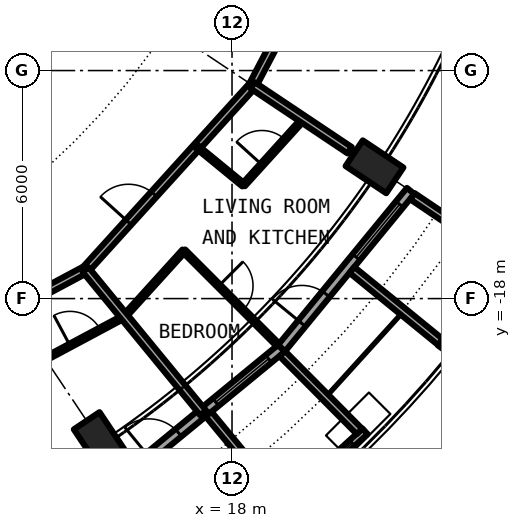
"""IFC4 building model, lengths in metres.
Left out: names, types, materials, properties, quantities, classifications, styles, units other than length and angle.
Written with IfcOpenShell. Run it as: python <this file> out.ifc"""

import sys

from ifc_helpers import new_model, si_unit, direction, frame, frame_2d, origin, origin_2d, place, context, subcontext, project, spatial, rectangle, circle, hollow_circle, extrude, element, fill, save


model = new_model("IFC4")
c1 = context("Model", 3, precision=1e-05, world=origin(), true_north=direction((0.0, 1.0)))
c2 = subcontext(c1, "Body", "Model", "MODEL_VIEW")
j1 = project(units=[si_unit("LENGTHUNIT", "METRE"), si_unit("PLANEANGLEUNIT", "RADIAN")], contexts=[c1])
p1 = place(None, origin())
s1 = spatial("IfcSite", under=j1, at=p1, CompositionType="ELEMENT")
p2 = place(p1, origin())
s2 = spatial("IfcBuilding", under=s1, at=p2, CompositionType="ELEMENT")
p3 = place(p2, frame((0.0, 0.0, 234.05)))
s3 = spatial("IfcBuildingStorey", under=s2, at=p3, CompositionType="ELEMENT", Elevation=234.05)
for number, where, z_axis, x_axis in (
    (1, (14.889, -22.283, 0.0), (-0.232, 0.347, 0.909), (-0.831, -0.556, 0.0)),
    (2, (22.283, -14.889, 0.0), (-0.347, 0.232, 0.909), (-0.556, -0.831, 0.0)),
):
    element("IfcColumn", number, at=place(p3, frame(where, z_axis=z_axis, x_axis=x_axis)), inside=s3, PredefinedType="COLUMN", context=c2, shape_type="SweptSolid", body=[
        extrude(hollow_circle(Radius=0.406, WallThickness=0.03, at=origin_2d()), origin(), (0.0, 0.0, 1.0), 3.081),
    ])
p4 = place(p3, frame((15.167, -22.699, 0.0), z_axis=(0.0, 0.0, 1.0), x_axis=(0.773019449054, 0.634382322723, 0.0)))
e3 = element("IfcWall", 3, at=p4, inside=s3, PredefinedType="SOLIDWALL", context=c2, shape_type="SweptSolid", body=[
    extrude(rectangle(XDim=5.352, YDim=0.25, at=frame_2d((2.676, 0.0))), origin(), (0.0, 0.0, 1.0), 2.7),
])
p5 = place(p4, frame((0.841, 0.0, 0.0)))
e4 = element("IfcOpeningElement", 4, at=p5, cuts=e3, PredefinedType="OPENING", context=c2, shape_type="SweptSolid", body=[
    extrude(rectangle(XDim=1.0, YDim=2.2, at=frame_2d((0.5, 1.1))), frame((0.0, 0.135, 0.0), z_axis=(0.0, -1.0, 0.0), x_axis=(1.0, 0.0, 0.0)), (0.0, 0.0, 1.0), 0.27),
])
p6 = place(p4, frame((3.111, 0.0, 0.3)))
e5 = element("IfcOpeningElement", 5, at=p6, cuts=e3, PredefinedType="OPENING", context=c2, shape_type="SweptSolid", body=[
    extrude(rectangle(XDim=1.8, YDim=2.1, at=frame_2d((0.9, 1.05))), frame((0.0, 0.135, 0.0), z_axis=(0.0, -1.0, 0.0), x_axis=(1.0, 0.0, 0.0)), (0.0, 0.0, 1.0), 0.27),
])
p7 = place(p3, frame((19.282, -23.503, -0.03), z_axis=(0.0, 0.0, 1.0), x_axis=(0.740998365753, 0.671506829416, 0.0)))
e6 = element("IfcWall", 6, at=p7, inside=s3, PredefinedType="SOLIDWALL", context=c2, shape_type="SweptSolid", body=[
    extrude(rectangle(XDim=2.993, YDim=0.2, at=frame_2d((1.497, 0.0))), origin(), (0.0, 0.0, 1.0), 2.73),
])
p8 = place(p7, frame((0.457, 0.0, 0.33)))
e7 = element("IfcOpeningElement", 7, at=p8, cuts=e6, PredefinedType="OPENING", context=c2, shape_type="SweptSolid", body=[
    extrude(circle(Radius=1.04, at=frame_2d((1.04, 1.04))), frame((0.0, 0.11, 0.0), z_axis=(0.0, -1.0, 0.0), x_axis=(1.0, 0.0, 0.0)), (0.0, 0.0, 1.0), 0.22),
])
p9 = place(p3, frame((17.384, -21.041, -0.03), z_axis=(0.0, 0.0, 1.0), x_axis=(0.63709551667, -0.770784861449, 0.0)))
e8 = element("IfcWall", 8, at=p9, inside=s3, PredefinedType="SOLIDWALL", context=c2, shape_type="SweptSolid", body=[
    extrude(rectangle(XDim=3.006, YDim=0.2, at=frame_2d((1.503, 0.0))), origin(), (0.0, 0.0, 1.0), 2.73),
])
p10 = place(p3, frame((19.323, -19.45, -0.03), z_axis=(0.0, 0.0, 1.0), x_axis=(0.704476739375, -0.709727076896, 0.0)))
e9 = element("IfcWall", 9, at=p10, inside=s3, PredefinedType="SOLIDWALL", context=c2, shape_type="SweptSolid", body=[
    extrude(rectangle(XDim=2.883, YDim=0.2, at=frame_2d((1.441, 0.0))), origin(), (0.0, 0.0, 1.0), 2.73),
])
p11 = place(p3, frame((19.304, -19.304, 0.0), z_axis=(0.0, 0.0, 1.0), x_axis=(0.634382322723, 0.773019449054, 0.0)))
e10 = element("IfcWall", 10, at=p11, inside=s3, PredefinedType="SOLIDWALL", context=c2, shape_type="SweptSolid", body=[
    extrude(rectangle(XDim=5.352, YDim=0.25, at=frame_2d((2.676, 0.0))), origin(), (0.0, 0.0, 1.0), 2.7),
])
p12 = place(p11, frame((0.841, 0.0, 0.0)))
e11 = element("IfcOpeningElement", 11, at=p12, cuts=e10, PredefinedType="OPENING", context=c2, shape_type="SweptSolid", body=[
    extrude(rectangle(XDim=1.0, YDim=2.2, at=frame_2d((0.5, 1.1))), frame((0.0, 0.135, 0.0), z_axis=(0.0, -1.0, 0.0), x_axis=(1.0, 0.0, 0.0)), (0.0, 0.0, 1.0), 0.27),
])
p13 = place(p11, frame((3.096, 0.0, 0.3)))
e12 = element("IfcOpeningElement", 12, at=p13, cuts=e10, PredefinedType="OPENING", context=c2, shape_type="SweptSolid", body=[
    extrude(rectangle(XDim=1.8, YDim=2.1, at=frame_2d((0.9, 1.05))), frame((0.0, 0.135, 0.0), z_axis=(0.0, -1.0, 0.0), x_axis=(1.0, 0.0, 0.0)), (0.0, 0.0, 1.0), 0.27),
])
p14 = place(p3, frame((23.496, -19.289, -0.03), z_axis=(0.0, 0.0, 1.0), x_axis=(0.595908005124, 0.803052706508, 0.0)))
e13 = element("IfcWall", 13, at=p14, inside=s3, PredefinedType="SOLIDWALL", context=c2, shape_type="SweptSolid", body=[
    extrude(rectangle(XDim=2.994, YDim=0.2, at=frame_2d((1.497, 0.0))), origin(), (0.0, 0.0, 1.0), 2.73),
])
p15 = place(p14, frame((0.457, 0.0, 0.33)))
e14 = element("IfcOpeningElement", 14, at=p15, cuts=e13, PredefinedType="OPENING", context=c2, shape_type="SweptSolid", body=[
    extrude(circle(Radius=1.04, at=frame_2d((1.04, 1.04))), frame((0.0, 0.11, 0.0), z_axis=(0.0, -1.0, 0.0), x_axis=(1.0, 0.0, 0.0)), (0.0, 0.0, 1.0), 0.22),
])
p16 = place(p3, frame((21.155, -17.246, -0.03), z_axis=(0.0, 0.0, 1.0), x_axis=(0.775338113639, -0.631546363729, 0.0)))
e15 = element("IfcWall", 15, at=p16, inside=s3, PredefinedType="SOLIDWALL", context=c2, shape_type="SweptSolid", body=[
    extrude(rectangle(XDim=3.005, YDim=0.2, at=frame_2d((1.502, 0.0))), origin(), (0.0, 0.0, 1.0), 2.73),
])
p17 = place(p3, frame((22.746, -15.307, -0.03), z_axis=(0.0, 0.0, 1.0), x_axis=(0.829448139117, -0.558583730979, 0.0)))
e16 = element("IfcWall", 16, at=p17, inside=s3, PredefinedType="SOLIDWALL", context=c2, shape_type="SweptSolid", body=[
    extrude(rectangle(XDim=2.883, YDim=0.2, at=frame_2d((1.441, 0.0))), origin(), (0.0, 0.0, 1.0), 2.73),
])
p18 = place(p3, frame((15.162, -18.475, 0.0), z_axis=(0.0, 0.0, 1.0), x_axis=(0.671528384412, 0.740978831634, 0.0)))
e17 = element("IfcWall", 17, at=p18, inside=s3, PredefinedType="PARTITIONING", context=c2, shape_type="SweptSolid", body=[
    extrude(rectangle(XDim=2.338, YDim=0.1, at=frame_2d((1.169, 0.0))), origin(), (0.0, 0.0, 1.0), 2.7),
])
p19 = place(p3, frame((18.302, -15.01, 0.0), z_axis=(0.0, 0.0, 1.0), x_axis=(0.671637685376, 0.740879760544, 0.0)))
e18 = element("IfcWall", 18, at=p19, inside=s3, PredefinedType="PARTITIONING", context=c2, shape_type="SweptSolid", body=[
    extrude(rectangle(XDim=2.338, YDim=0.1, at=frame_2d((1.169, 0.0))), origin(), (0.0, 0.0, 1.0), 2.7),
])
p20 = place(p19, frame((0.719, 0.0, 0.0)))
e19 = element("IfcOpeningElement", 19, at=p20, cuts=e18, PredefinedType="OPENING", context=c2, shape_type="SweptSolid", body=[
    extrude(rectangle(XDim=0.9, YDim=2.3, at=frame_2d((0.45, 1.15))), frame((0.0, 0.06, 0.0), z_axis=(0.0, -1.0, 0.0), x_axis=(1.0, 0.0, 0.0)), (0.0, 0.0, 1.0), 0.12),
])
p21 = place(p3, frame((13.106, -19.574, 0.0), z_axis=(0.0, 0.0, 1.0), x_axis=(0.881949682246, 0.471343566824, 0.0)))
e20 = element("IfcWall", 20, at=p21, inside=s3, PredefinedType="PARTITIONING", context=c2, shape_type="SweptSolid", body=[
    extrude(rectangle(XDim=2.331, YDim=0.1, at=frame_2d((1.166, 0.0))), origin(), (0.0, 0.0, 1.0), 2.7),
])
p22 = place(p21, frame((0.716, 0.0, 0.0)))
e21 = element("IfcOpeningElement", 21, at=p22, cuts=e20, PredefinedType="OPENING", context=c2, shape_type="SweptSolid", body=[
    extrude(rectangle(XDim=0.9, YDim=2.3, at=frame_2d((0.45, 1.15))), frame((0.0, 0.06, 0.0), z_axis=(0.0, -1.0, 0.0), x_axis=(1.0, 0.0, 0.0)), (0.0, 0.0, 1.0), 0.12),
])
p23 = place(p3, frame((18.542, -12.389, 0.0), z_axis=(0.0, 0.0, 1.0), x_axis=(0.465812036273, 0.88488369115, 0.0)))
e22 = element("IfcWall", 22, at=p23, inside=s3, PredefinedType="PARTITIONING", context=c2, shape_type="SweptSolid", body=[
    extrude(rectangle(XDim=1.687, YDim=0.2, at=frame_2d((0.844, 0.0))), origin(), (0.0, 0.0, 1.0), 2.7),
])
p24 = place(p3, frame((14.147, -17.238, 0.0), z_axis=(0.0, 0.0, 1.0), x_axis=(0.671561669125, 0.740948665268, 0.0)))
e23 = element("IfcWall", 23, at=p24, inside=s3, PredefinedType="PARTITIONING", context=c2, shape_type="SweptSolid", body=[
    extrude(rectangle(XDim=6.544, YDim=0.2, at=frame_2d((3.272, 0.0))), origin(), (0.0, 0.0, 1.0), 2.7),
])
p25 = place(p24, frame((1.682, 0.0, 0.0)))
e24 = element("IfcOpeningElement", 24, at=p25, cuts=e23, PredefinedType="OPENING", context=c2, shape_type="SweptSolid", body=[
    extrude(rectangle(XDim=1.0, YDim=2.3, at=frame_2d((0.5, 1.15))), frame((0.0, 0.11, 0.0), z_axis=(0.0, -1.0, 0.0), x_axis=(1.0, 0.0, 0.0)), (0.0, 0.0, 1.0), 0.22),
])
p26 = place(p3, frame((6.48, -21.339, 0.0), z_axis=(0.0, 0.0, 1.0), x_axis=(0.881794682218, 0.471633478892, 0.0)))
e25 = element("IfcWall", 25, at=p26, inside=s3, PredefinedType="PARTITIONING", context=c2, shape_type="SweptSolid", body=[
    extrude(rectangle(XDim=8.702, YDim=0.2, at=frame_2d((4.351, 0.0))), origin(), (0.0, 0.0, 1.0), 2.7),
])
p27 = place(p26, frame((2.758, 0.0, 0.0)))
e26 = element("IfcOpeningElement", 26, at=p27, cuts=e25, PredefinedType="OPENING", context=c2, shape_type="SweptSolid", body=[
    extrude(rectangle(XDim=1.0, YDim=2.3, at=frame_2d((0.5, 1.15))), frame((0.0, 0.11, 0.0), z_axis=(0.0, -1.0, 0.0), x_axis=(1.0, 0.0, 0.0)), (0.0, 0.0, 1.0), 0.22),
])
p28 = place(p3, frame((5.137, -16.938, 0.0), z_axis=(0.0, 0.0, 1.0), x_axis=(0.803229232922, 0.595670042371, 0.0)))
e27 = element("IfcWall", 27, at=p28, inside=s3, PredefinedType="PARTITIONING", context=c2, shape_type="SweptSolid", body=[
    extrude(rectangle(XDim=10.224, YDim=0.2, at=frame_2d((5.112, 0.0))), origin(), (0.0, 0.0, 1.0), 2.7),
])
p29 = place(p28, frame((4.612, 0.0, 0.0)))
e28 = element("IfcOpeningElement", 28, at=p29, cuts=e27, PredefinedType="OPENING", context=c2, shape_type="SweptSolid", body=[
    extrude(rectangle(XDim=1.0, YDim=2.3, at=frame_2d((0.5, 1.15))), frame((0.0, 0.11, 0.0), z_axis=(0.0, -1.0, 0.0), x_axis=(1.0, 0.0, 0.0)), (0.0, 0.0, 1.0), 0.22),
])
p30 = place(p3, frame((17.077, -14.006, 0.0), z_axis=(0.0, 0.0, 1.0), x_axis=(0.773476341377, -0.633825172528, 0.0)))
e29 = element("IfcWall", 29, at=p30, inside=s3, PredefinedType="PARTITIONING", context=c2, shape_type="SweptSolid", body=[
    extrude(rectangle(XDim=1.584, YDim=0.1, at=frame_2d((0.792, 0.0))), origin(), (0.0, 0.0, 1.0), 2.7),
])
p31 = place(p3, frame((14.147, -17.238, 0.0), z_axis=(0.0, 0.0, 1.0), x_axis=(0.634374159378, -0.773026148273, 0.0)))
e30 = element("IfcWall", 30, at=p31, inside=s3, PredefinedType="PARTITIONING", context=c2, shape_type="SweptSolid", body=[
    extrude(rectangle(XDim=4.876, YDim=0.2, at=frame_2d((2.438, 0.0))), origin(), (0.0, 0.0, 1.0), 2.7),
])
p32 = place(p3, frame((16.732, -16.743, 0.0), z_axis=(0.0, 0.0, 1.0), x_axis=(0.706967463531, -0.707246071398, 0.0)))
e31 = element("IfcWall", 31, at=p32, inside=s3, PredefinedType="PARTITIONING", context=c2, shape_type="SweptSolid", body=[
    extrude(rectangle(XDim=3.505, YDim=0.1, at=frame_2d((1.752, 0.0))), origin(), (0.0, 0.0, 1.0), 2.7),
])
p33 = place(p32, frame((1.303, 0.0, 0.0)))
e32 = element("IfcOpeningElement", 32, at=p33, cuts=e31, PredefinedType="OPENING", context=c2, shape_type="SweptSolid", body=[
    extrude(rectangle(XDim=0.9, YDim=2.3, at=frame_2d((0.45, 1.15))), frame((0.0, 0.06, 0.0), z_axis=(0.0, -1.0, 0.0), x_axis=(1.0, 0.0, 0.0)), (0.0, 0.0, 1.0), 0.12),
])
p34 = place(p3, frame((18.542, -12.389, 0.0), z_axis=(0.0, 0.0, 1.0), x_axis=(0.831340764735, -0.555763018642, 0.0)))
e33 = element("IfcWall", 33, at=p34, inside=s3, PredefinedType="PARTITIONING", context=c2, shape_type="SweptSolid", body=[
    extrude(rectangle(XDim=3.073, YDim=0.2, at=frame_2d((1.537, 0.0))), origin(), (0.0, 0.0, 1.0), 2.7),
])
p35 = place(p5, origin())
e34 = element("IfcDoor", 34, at=p35, inside=s3, OperationType="SINGLE_SWING_LEFT", PredefinedType="DOOR", context=c2, shape_type="SweptSolid", body=[
    extrude(rectangle(XDim=1.0, YDim=2.2, at=frame_2d((0.5, 1.1))), frame((0.0, 0.025, 0.0), z_axis=(0.0, -1.0, 0.0), x_axis=(1.0, 0.0, 0.0)), (0.0, 0.0, 1.0), 0.05),
])
fill(e4, e34)
p36 = place(p6, origin())
e35 = element("IfcWindow", 35, at=p36, inside=s3, PartitioningType="SINGLE_PANEL", PredefinedType="WINDOW", context=c2, shape_type="SweptSolid", body=[
    extrude(rectangle(XDim=1.8, YDim=2.1, at=frame_2d((0.9, 1.05))), frame((0.0, 0.03, 0.0), z_axis=(0.0, -1.0, 0.0), x_axis=(1.0, 0.0, 0.0)), (0.0, 0.0, 1.0), 0.06),
])
fill(e5, e35)
p37 = place(p8, origin())
e36 = element("IfcWindow", 36, at=p37, inside=s3, PartitioningType="SINGLE_PANEL", PredefinedType="WINDOW", context=c2, shape_type="SweptSolid", body=[
    extrude(circle(Radius=1.04, at=frame_2d((1.04, 1.04))), frame((0.0, 0.03, 0.0), z_axis=(0.0, -1.0, 0.0), x_axis=(1.0, 0.0, 0.0)), (0.0, 0.0, 1.0), 0.06),
])
fill(e7, e36)
p38 = place(p12, origin())
e37 = element("IfcDoor", 37, at=p38, inside=s3, OperationType="SINGLE_SWING_LEFT", PredefinedType="DOOR", context=c2, shape_type="SweptSolid", body=[
    extrude(rectangle(XDim=1.0, YDim=2.2, at=frame_2d((0.5, 1.1))), frame((0.0, 0.025, 0.0), z_axis=(0.0, -1.0, 0.0), x_axis=(1.0, 0.0, 0.0)), (0.0, 0.0, 1.0), 0.05),
])
fill(e11, e37)
p39 = place(p13, origin())
e38 = element("IfcWindow", 38, at=p39, inside=s3, PartitioningType="SINGLE_PANEL", PredefinedType="WINDOW", context=c2, shape_type="SweptSolid", body=[
    extrude(rectangle(XDim=1.8, YDim=2.1, at=frame_2d((0.9, 1.05))), frame((0.0, 0.03, 0.0), z_axis=(0.0, -1.0, 0.0), x_axis=(1.0, 0.0, 0.0)), (0.0, 0.0, 1.0), 0.06),
])
fill(e12, e38)
p40 = place(p22, origin())
e39 = element("IfcDoor", 39, at=p40, inside=s3, OperationType="SINGLE_SWING_LEFT", PredefinedType="DOOR", context=c2, shape_type="SweptSolid", body=[
    extrude(rectangle(XDim=0.9, YDim=2.3, at=frame_2d((0.45, 1.15))), frame((0.0, 0.025, 0.0), z_axis=(0.0, -1.0, 0.0), x_axis=(1.0, 0.0, 0.0)), (0.0, 0.0, 1.0), 0.05),
])
fill(e21, e39)
p41 = place(p25, origin())
e40 = element("IfcDoor", 40, at=p41, inside=s3, OperationType="SINGLE_SWING_LEFT", PredefinedType="DOOR", context=c2, shape_type="SweptSolid", body=[
    extrude(rectangle(XDim=1.0, YDim=2.3, at=frame_2d((0.5, 1.15))), frame((0.0, 0.025, 0.0), z_axis=(0.0, -1.0, 0.0), x_axis=(1.0, 0.0, 0.0)), (0.0, 0.0, 1.0), 0.05),
])
fill(e24, e40)
p42 = place(p20, origin())
e41 = element("IfcDoor", 41, at=p42, inside=s3, OperationType="SINGLE_SWING_LEFT", PredefinedType="DOOR", context=c2, shape_type="SweptSolid", body=[
    extrude(rectangle(XDim=0.9, YDim=2.3, at=frame_2d((0.45, 1.15))), frame((0.0, 0.025, 0.0), z_axis=(0.0, -1.0, 0.0), x_axis=(1.0, 0.0, 0.0)), (0.0, 0.0, 1.0), 0.05),
])
fill(e19, e41)
p43 = place(p33, origin())
e42 = element("IfcDoor", 42, at=p43, inside=s3, OperationType="SINGLE_SWING_LEFT", PredefinedType="DOOR", context=c2, shape_type="SweptSolid", body=[
    extrude(rectangle(XDim=0.9, YDim=2.3, at=frame_2d((0.45, 1.15))), frame((0.0, 0.025, 0.0), z_axis=(0.0, -1.0, 0.0), x_axis=(1.0, 0.0, 0.0)), (0.0, 0.0, 1.0), 0.05),
])
fill(e32, e42)
save(model, sys.argv[1])
